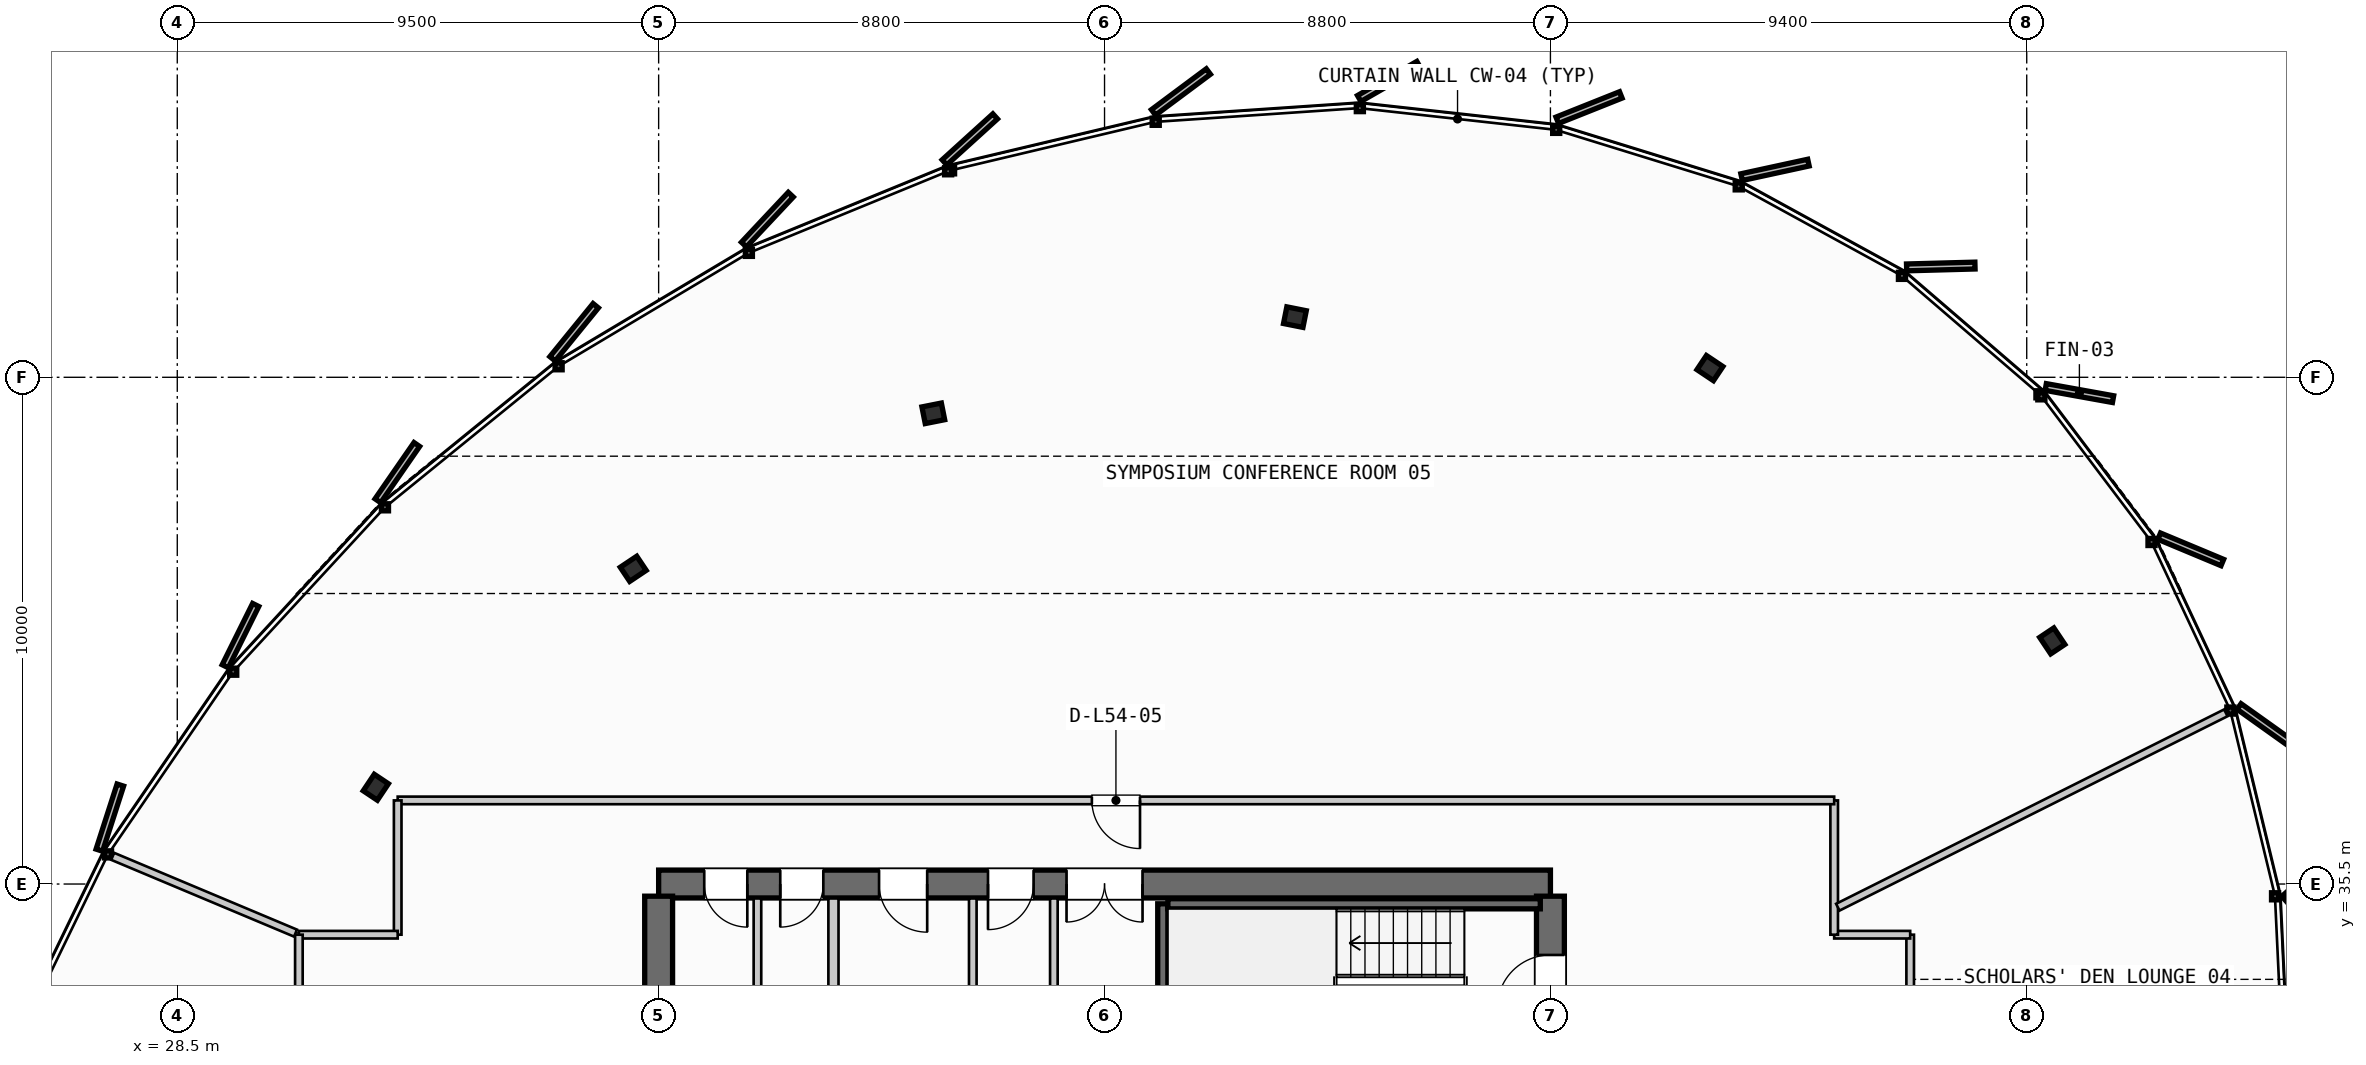
"""IFC4 building model, lengths in metres.
Left out: names, types, materials, properties, quantities, classifications, styles, units other than length and angle.
Written with IfcOpenShell. Run it as: python <this file> out.ifc"""

import sys

from ifc_helpers import new_model, si_unit, direction, frame, frame_2d, origin, origin_2d, place, context, subcontext, project, spatial, rectangle, i_section, extrude, source, transform, mapped, element, fill, save


model = new_model("IFC4")
c1 = context("Model", 3, precision=1e-05, world=origin(), true_north=direction((0.0, 1.0)))
c2 = subcontext(c1, "Body", "Model", "MODEL_VIEW")
j1 = project(units=[si_unit("LENGTHUNIT", "METRE"), si_unit("PLANEANGLEUNIT", "RADIAN")], contexts=[c1])
p1 = place(None, origin())
s1 = spatial("IfcSite", under=j1, at=p1, CompositionType="ELEMENT")
p2 = place(p1, origin())
s2 = spatial("IfcBuilding", under=s1, at=p2, CompositionType="ELEMENT")
p3 = place(p2, frame((0.0, 0.0, 207.9)))
s3 = spatial("IfcBuildingStorey", under=s2, at=p3, CompositionType="ELEMENT", Elevation=207.9)
p4 = place(p3, frame((55.6, 35.5, 0.0), z_axis=(0.0, 0.0, 1.0), x_axis=(-1.0, 0.0, 0.0)))
e1 = element("IfcWall", 1, at=p4, inside=s3, PredefinedType="SHEAR", context=c2, shape_type="SweptSolid", body=[
    extrude(rectangle(XDim=17.6, YDim=0.55, at=frame_2d((8.8, 0.0))), origin(), (0.0, 0.0, 1.0), 3.26),
])
p5 = place(p4, frame((8.05, 0.0, 0.0)))
e2 = element("IfcOpeningElement", 2, at=p5, cuts=e1, PredefinedType="OPENING", context=c2, shape_type="SweptSolid", body=[
    extrude(rectangle(XDim=1.5, YDim=2.2, at=frame_2d((0.75, 1.1))), frame((0.0, 0.285, 0.0), z_axis=(0.0, -1.0, 0.0), x_axis=(1.0, 0.0, 0.0)), (0.0, 0.0, 1.0), 0.57),
])
p6 = place(p4, frame((15.85, 0.0, 0.0)))
e3 = element("IfcOpeningElement", 3, at=p6, cuts=e1, PredefinedType="OPENING", context=c2, shape_type="SweptSolid", body=[
    extrude(rectangle(XDim=0.85, YDim=2.15, at=frame_2d((0.425, 1.075))), frame((0.0, 0.285, 0.0), z_axis=(0.0, -1.0, 0.0), x_axis=(1.0, 0.0, 0.0)), (0.0, 0.0, 1.0), 0.57),
])
p7 = place(p4, frame((14.35, 0.0, 0.0)))
e4 = element("IfcOpeningElement", 4, at=p7, cuts=e1, PredefinedType="OPENING", context=c2, shape_type="SweptSolid", body=[
    extrude(rectangle(XDim=0.85, YDim=2.15, at=frame_2d((0.425, 1.075))), frame((0.0, 0.285, 0.0), z_axis=(0.0, -1.0, 0.0), x_axis=(1.0, 0.0, 0.0)), (0.0, 0.0, 1.0), 0.57),
])
p8 = place(p4, frame((12.3, 0.0, 0.0)))
e5 = element("IfcOpeningElement", 5, at=p8, cuts=e1, PredefinedType="OPENING", context=c2, shape_type="SweptSolid", body=[
    extrude(rectangle(XDim=0.95, YDim=2.15, at=frame_2d((0.475, 1.075))), frame((0.0, 0.285, 0.0), z_axis=(0.0, -1.0, 0.0), x_axis=(1.0, 0.0, 0.0)), (0.0, 0.0, 1.0), 0.57),
])
p9 = place(p4, frame((10.2, 0.0, 0.0)))
e6 = element("IfcOpeningElement", 6, at=p9, cuts=e1, PredefinedType="OPENING", context=c2, shape_type="SweptSolid", body=[
    extrude(rectangle(XDim=0.9, YDim=2.15, at=frame_2d((0.45, 1.075))), frame((0.0, 0.285, 0.0), z_axis=(0.0, -1.0, 0.0), x_axis=(1.0, 0.0, 0.0)), (0.0, 0.0, 1.0), 0.57),
])
p10 = place(p3, frame((38.0, 35.26, 0.0), z_axis=(0.0, 0.0, 1.0), x_axis=(0.0, -1.0, 0.0)))
e7 = element("IfcWall", 7, at=p10, inside=s3, PredefinedType="SHEAR", context=c2, shape_type="SweptSolid", body=[
    extrude(rectangle(XDim=14.92, YDim=0.55, at=frame_2d((7.46, 0.0))), origin(), (0.0, 0.0, 1.0), 3.26),
])
p11 = place(p10, frame((5.21, 0.0, 0.0)))
e8 = element("IfcOpeningElement", 8, at=p11, cuts=e7, PredefinedType="OPENING", context=c2, shape_type="SweptSolid", body=[
    extrude(rectangle(XDim=1.1, YDim=2.2, at=frame_2d((0.55, 1.1))), frame((0.0, 0.285, 0.0), z_axis=(0.0, -1.0, 0.0), x_axis=(1.0, 0.0, 0.0)), (0.0, 0.0, 1.0), 0.57),
])
p12 = place(p3, frame((55.6, 20.34, 0.0), z_axis=(0.0, 0.0, 1.0), x_axis=(0.0, 1.0, 0.0)))
e9 = element("IfcWall", 9, at=p12, inside=s3, PredefinedType="SHEAR", context=c2, shape_type="SweptSolid", body=[
    extrude(rectangle(XDim=14.92, YDim=0.55, at=frame_2d((7.46, 0.0))), origin(), (0.0, 0.0, 1.0), 3.26),
])
p13 = place(p12, frame((12.71, 0.0, 0.0)))
e10 = element("IfcOpeningElement", 10, at=p13, cuts=e9, PredefinedType="OPENING", context=c2, shape_type="SweptSolid", body=[
    extrude(rectangle(XDim=1.05, YDim=2.15, at=frame_2d((0.525, 1.075))), frame((0.0, 0.285, 0.0), z_axis=(0.0, -1.0, 0.0), x_axis=(1.0, 0.0, 0.0)), (0.0, 0.0, 1.0), 0.57),
])
p14 = place(p12, frame((8.61, 0.0, 0.0)))
e11 = element("IfcOpeningElement", 11, at=p14, cuts=e9, PredefinedType="OPENING", context=c2, shape_type="SweptSolid", body=[
    extrude(rectangle(XDim=1.1, YDim=2.2, at=frame_2d((0.55, 1.1))), frame((0.0, 0.285, 0.0), z_axis=(0.0, -1.0, 0.0), x_axis=(1.0, 0.0, 0.0)), (0.0, 0.0, 1.0), 0.57),
])
m1 = source(origin(), c2, "Body", "SweptSolid", [
    extrude(i_section(OverallWidth=0.391, OverallDepth=0.335, WebThickness=0.023, FlangeThickness=0.034, FilletRadius=0.015, at=origin_2d()), origin(), (0.0, 0.0, 1.0), 3.26),
])
for number, where, z_axis, x_axis in (
    (12, (65.504, 40.298, 0.0), (0.0, 0.0, 1.0), (0.831, 0.556, 0.0)),
    (13, (58.748, 45.681, 0.0), (0.0, 0.0, 1.0), (0.556, 0.831, 0.0)),
    (14, (50.557, 46.688, 0.0), (0.0, 0.0, 1.0), (0.195, 0.981, 0.0)),
    (15, (43.421, 44.789, 0.0), (0.0, 0.0, 1.0), (-0.195, 0.981, 0.0)),
    (16, (37.499, 41.72, 0.0), (0.0, 0.0, 1.0), (-0.556, 0.831, 0.0)),
    (17, (32.418, 37.409, 0.0), (0.0, 0.0, 1.0), (-0.831, 0.556, 0.0)),
):
    element("IfcColumn", number, at=place(p3, frame(where, z_axis=z_axis, x_axis=x_axis)), inside=s3, PredefinedType="COLUMN", context=c2, shape_type="MappedRepresentation", body=[
        mapped(m1, transform((0.0, 0.0, 0.0), scale=1.0)),
    ])
p15 = place(p3, frame((47.95, 32.05, 0.0), z_axis=(0.0, 0.0, 1.0), x_axis=(0.0, 1.0, 0.0)))
e18 = element("IfcWall", 18, at=p15, inside=s3, PredefinedType="SHEAR", context=c2, shape_type="SweptSolid", body=[
    extrude(rectangle(XDim=3.06, YDim=0.2, at=frame_2d((1.53, 0.0))), origin(), (0.0, 0.0, 1.0), 3.26),
])
p16 = place(p3, frame((48.05, 35.11, 0.0), z_axis=(0.0, 0.0, 1.0), x_axis=(1.0, 0.0, 0.0)))
e19 = element("IfcWall", 19, at=p16, inside=s3, PredefinedType="SHEAR", context=c2, shape_type="SweptSolid", body=[
    extrude(rectangle(XDim=7.35, YDim=0.2, at=frame_2d((3.675, 0.0))), origin(), (0.0, 0.0, 1.0), 3.26),
])
p17 = place(p3, frame((41.45, 31.85, 0.0), z_axis=(0.0, 0.0, 1.0), x_axis=(0.0, 1.0, 0.0)))
e20 = element("IfcWall", 20, at=p17, inside=s3, PredefinedType="PARTITIONING", context=c2, shape_type="SweptSolid", body=[
    extrude(rectangle(XDim=3.365, YDim=0.2, at=frame_2d((1.683, 0.0))), origin(), (0.0, 0.0, 1.0), 2.455),
])
for number, where, z_axis, x_axis in (
    (21, (45.8, 31.85, 0.0), (0.0, 0.0, 1.0), (0.0, 1.0, 0.0)),
    (22, (39.95, 31.85, 0.0), (0.0, 0.0, 1.0), (0.0, 1.0, 0.0)),
):
    element("IfcWall", number, at=place(p3, frame(where, z_axis=z_axis, x_axis=x_axis)), inside=s3, PredefinedType="PARTITIONING", context=c2, shape_type="SweptSolid", body=[
        extrude(rectangle(XDim=3.365, YDim=0.15, at=frame_2d((1.683, 0.0))), origin(), (0.0, 0.0, 1.0), 2.455),
    ])
p18 = place(p3, frame((44.2, 31.85, 0.0), z_axis=(0.0, 0.0, 1.0), x_axis=(0.0, 1.0, 0.0)))
e23 = element("IfcWall", 23, at=p18, inside=s3, PredefinedType="PLUMBINGWALL", context=c2, shape_type="SweptSolid", body=[
    extrude(rectangle(XDim=3.365, YDim=0.15, at=frame_2d((1.683, 0.0))), origin(), (0.0, 0.0, 1.0), 2.455),
])
p19 = place(p3, frame((62.7, 32.8, 0.0), z_axis=(0.0, 0.0, 1.0), x_axis=(0.0, 1.0, 0.0)))
e24 = element("IfcWall", 24, at=p19, inside=s3, PredefinedType="PARTITIONING", context=c2, shape_type="SweptSolid", body=[
    extrude(rectangle(XDim=1.7, YDim=0.15, at=frame_2d((0.85, 0.0))), origin(), (0.0, 0.0, 1.0), 2.455),
])
p20 = place(p3, frame((62.7, 34.5, 0.0), z_axis=(0.0, 0.0, 1.0), x_axis=(-1.0, 0.0, 0.0)))
e25 = element("IfcWall", 25, at=p20, inside=s3, PredefinedType="PARTITIONING", context=c2, shape_type="SweptSolid", body=[
    extrude(rectangle(XDim=1.5, YDim=0.15, at=frame_2d((0.75, 0.0))), origin(), (0.0, 0.0, 1.0), 2.455),
])
p21 = place(p3, frame((61.2, 34.5, 0.0), z_axis=(0.0, 0.0, 1.0), x_axis=(0.0, 1.0, 0.0)))
e26 = element("IfcWall", 26, at=p21, inside=s3, PredefinedType="PARTITIONING", context=c2, shape_type="SweptSolid", body=[
    extrude(rectangle(XDim=2.65, YDim=0.15, at=frame_2d((1.325, 0.0))), origin(), (0.0, 0.0, 1.0), 2.455),
])
p22 = place(p3, frame((61.2, 37.15, 0.0), z_axis=(0.0, 0.0, 1.0), x_axis=(-1.0, 0.0, 0.0)))
e27 = element("IfcWall", 27, at=p22, inside=s3, PredefinedType="PARTITIONING", context=c2, shape_type="SweptSolid", body=[
    extrude(rectangle(XDim=28.35, YDim=0.15, at=frame_2d((14.175, 0.0))), origin(), (0.0, 0.0, 1.0), 2.455),
])
p23 = place(p22, frame((13.7, 0.0, 0.0)))
e28 = element("IfcOpeningElement", 28, at=p23, cuts=e27, PredefinedType="OPENING", context=c2, shape_type="SweptSolid", body=[
    extrude(rectangle(XDim=0.95, YDim=2.15, at=frame_2d((0.475, 1.075))), frame((0.0, 0.085, 0.0), z_axis=(0.0, -1.0, 0.0), x_axis=(1.0, 0.0, 0.0)), (0.0, 0.0, 1.0), 0.17),
])
p24 = place(p3, frame((32.85, 37.15, 0.0), z_axis=(0.0, 0.0, 1.0), x_axis=(0.0, -1.0, 0.0)))
e29 = element("IfcWall", 29, at=p24, inside=s3, PredefinedType="PARTITIONING", context=c2, shape_type="SweptSolid", body=[
    extrude(rectangle(XDim=2.65, YDim=0.15, at=frame_2d((1.325, 0.0))), origin(), (0.0, 0.0, 1.0), 2.455),
])
p25 = place(p3, frame((32.85, 34.5, 0.0), z_axis=(0.0, 0.0, 1.0), x_axis=(-1.0, 0.0, 0.0)))
e30 = element("IfcWall", 30, at=p25, inside=s3, PredefinedType="PARTITIONING", context=c2, shape_type="SweptSolid", body=[
    extrude(rectangle(XDim=1.95, YDim=0.15, at=frame_2d((0.975, 0.0))), origin(), (0.0, 0.0, 1.0), 2.455),
])
p26 = place(p3, frame((30.9, 34.5, 0.0), z_axis=(0.0, 0.0, 1.0), x_axis=(0.0, -1.0, 0.0)))
e31 = element("IfcWall", 31, at=p26, inside=s3, PredefinedType="PARTITIONING", context=c2, shape_type="SweptSolid", body=[
    extrude(rectangle(XDim=1.7, YDim=0.15, at=frame_2d((0.85, 0.0))), origin(), (0.0, 0.0, 1.0), 2.455),
])
p27 = place(p3, frame((61.271, 35.042, 0.0), z_axis=(0.0, 0.0, 1.0), x_axis=(0.894119133941, 0.447829179844, 0.0)))
e32 = element("IfcWall", 32, at=p27, inside=s3, PredefinedType="PARTITIONING", context=c2, shape_type="SweptSolid", body=[
    extrude(rectangle(XDim=8.565, YDim=0.15, at=frame_2d((4.283, 0.0))), origin(), (0.0, 0.0, 1.0), 2.455),
])
p28 = place(p3, frame((30.834, 34.531, 0.0), z_axis=(0.0, 0.0, 1.0), x_axis=(-0.922004819601, 0.387178398976, 0.0)))
e33 = element("IfcWall", 33, at=p28, inside=s3, PredefinedType="PARTITIONING", context=c2, shape_type="SweptSolid", body=[
    extrude(rectangle(XDim=3.914, YDim=0.15, at=frame_2d((1.957, 0.0))), origin(), (0.0, 0.0, 1.0), 2.455),
])
m2 = source(origin(), c2, "Body", "SweptSolid", [
    extrude(rectangle(XDim=1.05, YDim=2.15, at=frame_2d((0.525, 1.075))), frame((0.0, 0.025, 0.0), z_axis=(0.0, -1.0, 0.0), x_axis=(1.0, 0.0, 0.0)), (0.0, 0.0, 1.0), 0.05),
])
p29 = place(p13, origin())
e34 = element("IfcDoor", 34, at=p29, inside=s3, OperationType="SINGLE_SWING_LEFT", PredefinedType="DOOR", context=c2, shape_type="MappedRepresentation", body=[
    mapped(m2, transform((0.0, 0.0, 0.0), scale=1.0)),
])
fill(e10, e34)
m3 = source(origin(), c2, "Body", "SweptSolid", [
    extrude(rectangle(XDim=1.5, YDim=2.2, at=frame_2d((0.75, 1.1))), frame((0.0, 0.025, 0.0), z_axis=(0.0, -1.0, 0.0), x_axis=(1.0, 0.0, 0.0)), (0.0, 0.0, 1.0), 0.05),
])
p30 = place(p5, origin())
e35 = element("IfcDoor", 35, at=p30, inside=s3, OperationType="DOUBLE_DOOR_SINGLE_SWING", PredefinedType="DOOR", context=c2, shape_type="MappedRepresentation", body=[
    mapped(m3, transform((0.0, 0.0, 0.0), scale=1.0)),
])
fill(e2, e35)
m4 = source(origin(), c2, "Body", "SweptSolid", [
    extrude(rectangle(XDim=0.85, YDim=2.15, at=frame_2d((0.425, 1.075))), frame((0.0, 0.025, 0.0), z_axis=(0.0, -1.0, 0.0), x_axis=(1.0, 0.0, 0.0)), (0.0, 0.0, 1.0), 0.05),
])
p31 = place(p6, origin())
e36 = element("IfcDoor", 36, at=p31, inside=s3, OperationType="SINGLE_SWING_LEFT", PredefinedType="DOOR", context=c2, shape_type="MappedRepresentation", body=[
    mapped(m4, transform((0.0, 0.0, 0.0), scale=1.0)),
])
fill(e3, e36)
p32 = place(p7, origin())
e37 = element("IfcDoor", 37, at=p32, inside=s3, OperationType="SINGLE_SWING_RIGHT", PredefinedType="DOOR", context=c2, shape_type="MappedRepresentation", body=[
    mapped(m4, transform((0.0, 0.0, 0.0), scale=1.0)),
])
fill(e4, e37)
m5 = source(origin(), c2, "Body", "SweptSolid", [
    extrude(rectangle(XDim=0.95, YDim=2.15, at=frame_2d((0.475, 1.075))), frame((0.0, 0.025, 0.0), z_axis=(0.0, -1.0, 0.0), x_axis=(1.0, 0.0, 0.0)), (0.0, 0.0, 1.0), 0.05),
])
p33 = place(p8, origin())
e38 = element("IfcDoor", 38, at=p33, inside=s3, OperationType="SINGLE_SWING_LEFT", PredefinedType="DOOR", context=c2, shape_type="MappedRepresentation", body=[
    mapped(m5, transform((0.0, 0.0, 0.0), scale=1.0)),
])
fill(e5, e38)
m6 = source(origin(), c2, "Body", "SweptSolid", [
    extrude(rectangle(XDim=0.9, YDim=2.15, at=frame_2d((0.45, 1.075))), frame((0.0, 0.025, 0.0), z_axis=(0.0, -1.0, 0.0), x_axis=(1.0, 0.0, 0.0)), (0.0, 0.0, 1.0), 0.05),
])
p34 = place(p9, origin())
e39 = element("IfcDoor", 39, at=p34, inside=s3, OperationType="SINGLE_SWING_RIGHT", PredefinedType="DOOR", context=c2, shape_type="MappedRepresentation", body=[
    mapped(m6, transform((0.0, 0.0, 0.0), scale=1.0)),
])
fill(e6, e39)
p35 = place(p23, origin())
e40 = element("IfcDoor", 40, at=p35, inside=s3, OperationType="SINGLE_SWING_LEFT", PredefinedType="DOOR", context=c2, shape_type="MappedRepresentation", body=[
    mapped(m5, transform((0.0, 0.0, 0.0), scale=1.0)),
])
fill(e28, e40)
save(model, sys.argv[1])
